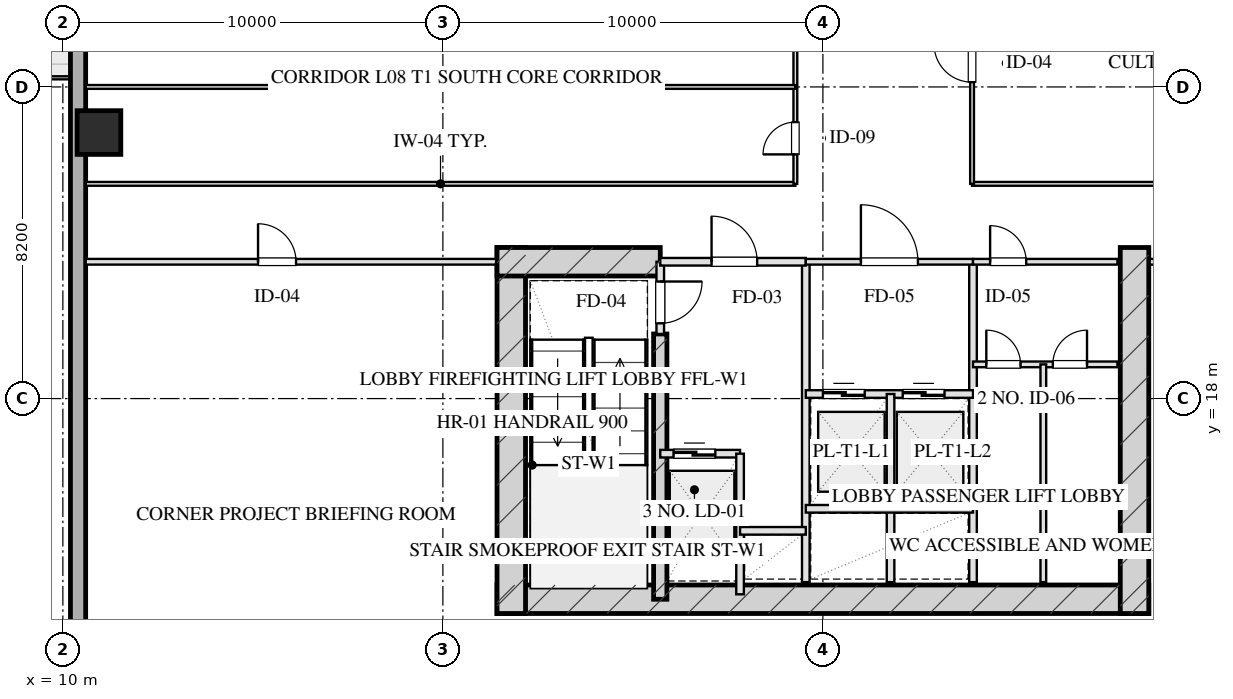
"""IFC4 building model, lengths in metres.
Left out: names, types, materials, properties, quantities, classifications, styles, units other than length and angle.
Written with IfcOpenShell. Run it as: python <this file> out.ifc"""

import sys

from ifc_helpers import new_model, si_unit, direction, frame, frame_2d, origin, origin_2d, place, context, subcontext, project, spatial, rectangle, hollow_rectangle, extrude, element, fill, save


model = new_model("IFC4")
c1 = context("Model", 3, precision=1e-05, world=origin(), true_north=direction((0.0, 1.0)))
c2 = subcontext(c1, "Body", "Model", "MODEL_VIEW")
j1 = project(units=[si_unit("LENGTHUNIT", "METRE"), si_unit("PLANEANGLEUNIT", "RADIAN")], contexts=[c1])
p1 = place(None, origin())
s1 = spatial("IfcSite", under=j1, at=p1, CompositionType="ELEMENT")
p2 = place(p1, origin())
s2 = spatial("IfcBuilding", under=s1, at=p2, CompositionType="ELEMENT")
p3 = place(p2, frame((0.0, 0.0, 38.0)))
s3 = spatial("IfcBuildingStorey", under=s2, at=p3, CompositionType="ELEMENT", Elevation=38.0)
p4 = place(p3, frame((21.425, 12.72, 0.0), z_axis=(0.0, 0.0, 1.0), x_axis=(1.0, 0.0, 0.0)))
e1 = element("IfcWall", 1, at=p4, inside=s3, PredefinedType="SHEAR", context=c2, shape_type="SweptSolid", body=[
    extrude(rectangle(XDim=17.15, YDim=0.75, at=frame_2d((8.575, 0.0))), origin(), (0.0, 0.0, 1.0), 4.0),
])
for number, where, z_axis, x_axis in (
    (2, (21.8, 21.975, 0.0), (0.0, 0.0, 1.0), (0.0, -1.0, 0.0)),
    (3, (38.2, 21.975, 0.0), (0.0, 0.0, 1.0), (0.0, -1.0, 0.0)),
):
    element("IfcWall", number, at=place(p3, frame(where, z_axis=z_axis, x_axis=x_axis)), inside=s3, PredefinedType="SHEAR", context=c2, shape_type="SweptSolid", body=[
        extrude(rectangle(XDim=9.63, YDim=0.75, at=frame_2d((4.815, 0.0))), origin(), (0.0, 0.0, 1.0), 4.0),
    ])
p5 = place(p3, frame((25.72, 19.7, 0.0), z_axis=(0.0, 0.0, 1.0), x_axis=(0.0, -1.0, 0.0)))
e4 = element("IfcWall", 4, at=p5, inside=s3, PredefinedType="SHEAR", context=c2, shape_type="SweptSolid", body=[
    extrude(rectangle(XDim=6.98, YDim=0.35, at=frame_2d((3.49, 0.0))), origin(), (0.0, 0.0, 1.0), 4.0),
])
p6 = place(p3, frame((21.425, 21.6, 0.0), z_axis=(0.0, 0.0, 1.0), x_axis=(1.0, 0.0, 0.0)))
e5 = element("IfcWall", 5, at=p6, inside=s3, PredefinedType="SHEAR", context=c2, shape_type="SweptSolid", body=[
    extrude(rectangle(XDim=4.295, YDim=0.75, at=frame_2d((2.147, 0.0))), origin(), (0.0, 0.0, 1.0), 4.0),
])
p7 = place(p3, frame((10.95, 25.0, 0.0), z_axis=(0.0, 0.0, 1.0), x_axis=(1.0, 0.0, 0.0)))
e6 = element("IfcColumn", 6, at=p7, inside=s3, PredefinedType="COLUMN", context=c2, shape_type="SweptSolid", body=[
    extrude(hollow_rectangle(XDim=1.15, YDim=1.15, WallThickness=0.04, at=origin_2d()), origin(), (0.0, 0.0, 1.0), 4.001),
])
p8 = place(p3, frame((10.4, 7.2, 0.0), z_axis=(0.0, 0.0, 1.0), x_axis=(0.0, 1.0, 0.0)))
e7 = element("IfcWall", 7, at=p8, inside=s3, PredefinedType="SOLIDWALL", context=c2, shape_type="SweptSolid", body=[
    extrude(rectangle(XDim=53.6, YDim=0.4, at=frame_2d((26.8, 0.0))), origin(), (0.0, 0.0, 1.0), 3.16),
])
p9 = place(p8, frame((28.15, 0.0, 0.75)))
e8 = element("IfcOpeningElement", 8, at=p9, cuts=e7, PredefinedType="OPENING", context=c2, shape_type="SweptSolid", body=[
    extrude(rectangle(XDim=2.5, YDim=1.75, at=frame_2d((1.25, 0.875))), frame((0.0, 0.21, 0.0), z_axis=(0.0, -1.0, 0.0), x_axis=(1.0, 0.0, 0.0)), (0.0, 0.0, 1.0), 0.42),
])
p10 = place(p8, frame((20.45, 0.0, 0.0)))
e9 = element("IfcOpeningElement", 9, at=p10, cuts=e7, PredefinedType="OPENING", context=c2, shape_type="SweptSolid", body=[
    extrude(rectangle(XDim=1.1, YDim=2.15, at=frame_2d((0.55, 1.075))), frame((0.0, 0.21, 0.0), z_axis=(0.0, -1.0, 0.0), x_axis=(1.0, 0.0, 0.0)), (0.0, 0.0, 1.0), 0.42),
])
p11 = place(p3, frame((25.72, 21.6, 0.0), z_axis=(0.0, 0.0, 1.0), x_axis=(0.0, -1.0, 0.0)))
e10 = element("IfcWall", 10, at=p11, inside=s3, PredefinedType="PARTITIONING", context=c2, shape_type="SweptSolid", body=[
    extrude(rectangle(XDim=1.9, YDim=0.2, at=frame_2d((0.95, 0.0))), origin(), (0.0, 0.0, 1.0), 3.725),
])
p12 = place(p11, frame((0.52, 0.0, 0.0)))
e11 = element("IfcOpeningElement", 11, at=p12, cuts=e10, PredefinedType="OPENING", context=c2, shape_type="SweptSolid", body=[
    extrude(rectangle(XDim=1.1, YDim=2.05, at=frame_2d((0.55, 1.025))), frame((0.0, 0.11, 0.0), z_axis=(0.0, -1.0, 0.0), x_axis=(1.0, 0.0, 0.0)), (0.0, 0.0, 1.0), 0.22),
])
p13 = place(p3, frame((29.55, 21.6, 0.0), z_axis=(0.0, 0.0, 1.0), x_axis=(0.0, -1.0, 0.0)))
e12 = element("IfcWall", 12, at=p13, inside=s3, PredefinedType="PARTITIONING", context=c2, shape_type="SweptSolid", body=[
    extrude(rectangle(XDim=8.43, YDim=0.2, at=frame_2d((4.215, 0.0))), origin(), (0.0, 0.0, 1.0), 3.725),
])
p14 = place(p3, frame((25.72, 21.6, 0.0), z_axis=(0.0, 0.0, 1.0), x_axis=(1.0, 0.0, 0.0)))
e13 = element("IfcWall", 13, at=p14, inside=s3, PredefinedType="PARTITIONING", context=c2, shape_type="SweptSolid", body=[
    extrude(rectangle(XDim=3.83, YDim=0.2, at=frame_2d((1.915, 0.0))), origin(), (0.0, 0.0, 1.0), 3.725),
])
p15 = place(p14, frame((1.35, 0.0, 0.0)))
e14 = element("IfcOpeningElement", 14, at=p15, cuts=e13, PredefinedType="OPENING", context=c2, shape_type="SweptSolid", body=[
    extrude(rectangle(XDim=1.2, YDim=2.05, at=frame_2d((0.6, 1.025))), frame((0.0, 0.11, 0.0), z_axis=(0.0, -1.0, 0.0), x_axis=(1.0, 0.0, 0.0)), (0.0, 0.0, 1.0), 0.22),
])
p16 = place(p3, frame((25.72, 16.55, 0.0), z_axis=(0.0, 0.0, 1.0), x_axis=(1.0, 0.0, 0.0)))
e15 = element("IfcWall", 15, at=p16, inside=s3, PredefinedType="PARTITIONING", context=c2, shape_type="SweptSolid", body=[
    extrude(rectangle(XDim=2.1, YDim=0.2, at=frame_2d((1.05, 0.0))), origin(), (0.0, 0.0, 1.0), 3.725),
])
p17 = place(p16, frame((0.35, 0.0, 0.0)))
e16 = element("IfcOpeningElement", 16, at=p17, cuts=e15, PredefinedType="OPENING", context=c2, shape_type="SweptSolid", body=[
    extrude(rectangle(XDim=1.1, YDim=2.05, at=frame_2d((0.55, 1.025))), frame((0.0, 0.11, 0.0), z_axis=(0.0, -1.0, 0.0), x_axis=(1.0, 0.0, 0.0)), (0.0, 0.0, 1.0), 0.22),
])
p18 = place(p3, frame((27.82, 16.55, 0.0), z_axis=(0.0, 0.0, 1.0), x_axis=(0.0, -1.0, 0.0)))
e17 = element("IfcWall", 17, at=p18, inside=s3, PredefinedType="PARTITIONING", context=c2, shape_type="SweptSolid", body=[
    extrude(rectangle(XDim=3.7, YDim=0.2, at=frame_2d((1.85, 0.0))), origin(), (0.0, 0.0, 1.0), 3.725),
])
p19 = place(p3, frame((27.82, 14.52, 0.0), z_axis=(0.0, 0.0, 1.0), x_axis=(1.0, 0.0, 0.0)))
e18 = element("IfcWall", 18, at=p19, inside=s3, PredefinedType="PARTITIONING", context=c2, shape_type="SweptSolid", body=[
    extrude(rectangle(XDim=1.73, YDim=0.2, at=frame_2d((0.865, 0.0))), origin(), (0.0, 0.0, 1.0), 3.725),
])
p20 = place(p3, frame((33.95, 21.6, 0.0), z_axis=(0.0, 0.0, 1.0), x_axis=(0.0, -1.0, 0.0)))
e19 = element("IfcWall", 19, at=p20, inside=s3, PredefinedType="PARTITIONING", context=c2, shape_type="SweptSolid", body=[
    extrude(rectangle(XDim=8.43, YDim=0.2, at=frame_2d((4.215, 0.0))), origin(), (0.0, 0.0, 1.0), 3.725),
])
p21 = place(p3, frame((29.55, 21.6, 0.0), z_axis=(0.0, 0.0, 1.0), x_axis=(1.0, 0.0, 0.0)))
e20 = element("IfcWall", 20, at=p21, inside=s3, PredefinedType="PARTITIONING", context=c2, shape_type="SweptSolid", body=[
    extrude(rectangle(XDim=4.4, YDim=0.15, at=frame_2d((2.2, 0.0))), origin(), (0.0, 0.0, 1.0), 3.725),
])
p22 = place(p21, frame((1.45, 0.0, 0.0)))
e21 = element("IfcOpeningElement", 21, at=p22, cuts=e20, PredefinedType="OPENING", context=c2, shape_type="SweptSolid", body=[
    extrude(rectangle(XDim=1.5, YDim=2.05, at=frame_2d((0.75, 1.025))), frame((0.0, 0.085, 0.0), z_axis=(0.0, -1.0, 0.0), x_axis=(1.0, 0.0, 0.0)), (0.0, 0.0, 1.0), 0.17),
])
p23 = place(p3, frame((29.55, 18.12, 0.0), z_axis=(0.0, 0.0, 1.0), x_axis=(1.0, 0.0, 0.0)))
e22 = element("IfcWall", 22, at=p23, inside=s3, PredefinedType="PARTITIONING", context=c2, shape_type="SweptSolid", body=[
    extrude(rectangle(XDim=4.4, YDim=0.2, at=frame_2d((2.2, 0.0))), origin(), (0.0, 0.0, 1.0), 3.725),
])
p24 = place(p23, frame((0.45, 0.0, 0.0)))
e23 = element("IfcOpeningElement", 23, at=p24, cuts=e22, PredefinedType="OPENING", context=c2, shape_type="SweptSolid", body=[
    extrude(rectangle(XDim=1.1, YDim=2.05, at=frame_2d((0.55, 1.025))), frame((0.0, 0.11, 0.0), z_axis=(0.0, -1.0, 0.0), x_axis=(1.0, 0.0, 0.0)), (0.0, 0.0, 1.0), 0.22),
])
p25 = place(p23, frame((2.55, 0.0, 0.0)))
e24 = element("IfcOpeningElement", 24, at=p25, cuts=e22, PredefinedType="OPENING", context=c2, shape_type="SweptSolid", body=[
    extrude(rectangle(XDim=1.1, YDim=2.05, at=frame_2d((0.55, 1.025))), frame((0.0, 0.11, 0.0), z_axis=(0.0, -1.0, 0.0), x_axis=(1.0, 0.0, 0.0)), (0.0, 0.0, 1.0), 0.22),
])
p26 = place(p3, frame((31.78, 18.12, 0.0), z_axis=(0.0, 0.0, 1.0), x_axis=(0.0, -1.0, 0.0)))
e25 = element("IfcWall", 25, at=p26, inside=s3, PredefinedType="PARTITIONING", context=c2, shape_type="SweptSolid", body=[
    extrude(rectangle(XDim=4.95, YDim=0.2, at=frame_2d((2.475, 0.0))), origin(), (0.0, 0.0, 1.0), 3.725),
])
p27 = place(p3, frame((29.55, 15.1, 0.0), z_axis=(0.0, 0.0, 1.0), x_axis=(1.0, 0.0, 0.0)))
e26 = element("IfcWall", 26, at=p27, inside=s3, PredefinedType="PARTITIONING", context=c2, shape_type="SweptSolid", body=[
    extrude(rectangle(XDim=4.4, YDim=0.2, at=frame_2d((2.2, 0.0))), origin(), (0.0, 0.0, 1.0), 3.725),
])
p28 = place(p3, frame((33.95, 21.6, 0.0), z_axis=(0.0, 0.0, 1.0), x_axis=(1.0, 0.0, 0.0)))
e27 = element("IfcWall", 27, at=p28, inside=s3, PredefinedType="PARTITIONING", context=c2, shape_type="SweptSolid", body=[
    extrude(rectangle(XDim=3.8, YDim=0.15, at=frame_2d((1.9, 0.0))), origin(), (0.0, 0.0, 1.0), 3.725),
])
p29 = place(p28, frame((0.45, 0.0, 0.0)))
e28 = element("IfcOpeningElement", 28, at=p29, cuts=e27, PredefinedType="OPENING", context=c2, shape_type="SweptSolid", body=[
    extrude(rectangle(XDim=0.95, YDim=2.05, at=frame_2d((0.475, 1.025))), frame((0.0, 0.085, 0.0), z_axis=(0.0, -1.0, 0.0), x_axis=(1.0, 0.0, 0.0)), (0.0, 0.0, 1.0), 0.17),
])
p30 = place(p3, frame((33.95, 18.9, 0.0), z_axis=(0.0, 0.0, 1.0), x_axis=(1.0, 0.0, 0.0)))
e29 = element("IfcWall", 29, at=p30, inside=s3, PredefinedType="PARTITIONING", context=c2, shape_type="SweptSolid", body=[
    extrude(rectangle(XDim=3.8, YDim=0.15, at=frame_2d((1.9, 0.0))), origin(), (0.0, 0.0, 1.0), 3.725),
])
p31 = place(p30, frame((0.35, 0.0, 0.0)))
e30 = element("IfcOpeningElement", 30, at=p31, cuts=e29, PredefinedType="OPENING", context=c2, shape_type="SweptSolid", body=[
    extrude(rectangle(XDim=0.9, YDim=2.05, at=frame_2d((0.45, 1.025))), frame((0.0, 0.085, 0.0), z_axis=(0.0, -1.0, 0.0), x_axis=(1.0, 0.0, 0.0)), (0.0, 0.0, 1.0), 0.17),
])
p32 = place(p30, frame((2.1, 0.0, 0.0)))
e31 = element("IfcOpeningElement", 31, at=p32, cuts=e29, PredefinedType="OPENING", context=c2, shape_type="SweptSolid", body=[
    extrude(rectangle(XDim=0.9, YDim=2.05, at=frame_2d((0.45, 1.025))), frame((0.0, 0.085, 0.0), z_axis=(0.0, -1.0, 0.0), x_axis=(1.0, 0.0, 0.0)), (0.0, 0.0, 1.0), 0.17),
])
p33 = place(p3, frame((35.8, 18.9, 0.0), z_axis=(0.0, 0.0, 1.0), x_axis=(0.0, -1.0, 0.0)))
e32 = element("IfcWall", 32, at=p33, inside=s3, PredefinedType="PARTITIONING", context=c2, shape_type="SweptSolid", body=[
    extrude(rectangle(XDim=5.73, YDim=0.15, at=frame_2d((2.865, 0.0))), origin(), (0.0, 0.0, 1.0), 3.725),
])
p34 = place(p3, frame((10.6, 21.6, 0.0), z_axis=(0.0, 0.0, 1.0), x_axis=(1.0, 0.0, 0.0)))
e33 = element("IfcWall", 33, at=p34, inside=s3, PredefinedType="PARTITIONING", context=c2, shape_type="SweptSolid", body=[
    extrude(rectangle(XDim=10.8, YDim=0.15, at=frame_2d((5.4, 0.0))), origin(), (0.0, 0.0, 1.0), 3.725),
])
p35 = place(p34, frame((4.536, 0.0, 0.0)))
e34 = element("IfcOpeningElement", 34, at=p35, cuts=e33, PredefinedType="OPENING", context=c2, shape_type="SweptSolid", body=[
    extrude(rectangle(XDim=1.0, YDim=2.05, at=frame_2d((0.5, 1.025))), frame((0.0, 0.085, 0.0), z_axis=(0.0, -1.0, 0.0), x_axis=(1.0, 0.0, 0.0)), (0.0, 0.0, 1.0), 0.17),
])
p36 = place(p3, frame((38.6, 21.6, 0.0), z_axis=(0.0, 0.0, 1.0), x_axis=(1.0, 0.0, 0.0)))
e35 = element("IfcWall", 35, at=p36, inside=s3, PredefinedType="PARTITIONING", context=c2, shape_type="SweptSolid", body=[
    extrude(rectangle(XDim=10.8, YDim=0.15, at=frame_2d((5.4, 0.0))), origin(), (0.0, 0.0, 1.0), 3.725),
])
p37 = place(p36, frame((4.536, 0.0, 0.0)))
e36 = element("IfcOpeningElement", 36, at=p37, cuts=e35, PredefinedType="OPENING", context=c2, shape_type="SweptSolid", body=[
    extrude(rectangle(XDim=1.0, YDim=2.05, at=frame_2d((0.5, 1.025))), frame((0.0, 0.085, 0.0), z_axis=(0.0, -1.0, 0.0), x_axis=(1.0, 0.0, 0.0)), (0.0, 0.0, 1.0), 0.17),
])
p38 = place(p3, frame((10.6, 23.65, 0.0), z_axis=(0.0, 0.0, 1.0), x_axis=(1.0, 0.0, 0.0)))
e37 = element("IfcWall", 37, at=p38, inside=s3, PredefinedType="MOVABLE", context=c2, shape_type="SweptSolid", body=[
    extrude(rectangle(XDim=18.675, YDim=0.1, at=frame_2d((9.337, 0.0))), origin(), (0.0, 0.0, 1.0), 3.725),
])
p39 = place(p3, frame((33.925, 23.65, 0.0), z_axis=(0.0, 0.0, 1.0), x_axis=(1.0, 0.0, 0.0)))
e38 = element("IfcWall", 38, at=p39, inside=s3, PredefinedType="MOVABLE", context=c2, shape_type="SweptSolid", body=[
    extrude(rectangle(XDim=15.475, YDim=0.1, at=frame_2d((7.737, 0.0))), origin(), (0.0, 0.0, 1.0), 3.725),
])
p40 = place(p3, frame((29.275, 23.65, 0.0), z_axis=(0.0, 0.0, 1.0), x_axis=(0.0, 1.0, 0.0)))
e39 = element("IfcWall", 39, at=p40, inside=s3, PredefinedType="MOVABLE", context=c2, shape_type="SweptSolid", body=[
    extrude(rectangle(XDim=20.7, YDim=0.1, at=frame_2d((10.35, 0.0))), origin(), (0.0, 0.0, 1.0), 3.725),
])
p41 = place(p40, frame((0.775, 0.0, 0.0)))
e40 = element("IfcOpeningElement", 40, at=p41, cuts=e39, PredefinedType="OPENING", context=c2, shape_type="SweptSolid", body=[
    extrude(rectangle(XDim=0.85, YDim=2.05, at=frame_2d((0.425, 1.025))), frame((0.0, 0.06, 0.0), z_axis=(0.0, -1.0, 0.0), x_axis=(1.0, 0.0, 0.0)), (0.0, 0.0, 1.0), 0.12),
])
p42 = place(p40, frame((3.95, 0.0, 0.0)))
e41 = element("IfcOpeningElement", 41, at=p42, cuts=e39, PredefinedType="OPENING", context=c2, shape_type="SweptSolid", body=[
    extrude(rectangle(XDim=1.0, YDim=2.05, at=frame_2d((0.5, 1.025))), frame((0.0, 0.06, 0.0), z_axis=(0.0, -1.0, 0.0), x_axis=(1.0, 0.0, 0.0)), (0.0, 0.0, 1.0), 0.12),
])
p43 = place(p40, frame((8.364, 0.0, 0.0)))
e42 = element("IfcOpeningElement", 42, at=p43, cuts=e39, PredefinedType="OPENING", context=c2, shape_type="SweptSolid", body=[
    extrude(rectangle(XDim=1.05, YDim=2.05, at=frame_2d((0.525, 1.025))), frame((0.0, 0.06, 0.0), z_axis=(0.0, -1.0, 0.0), x_axis=(1.0, 0.0, 0.0)), (0.0, 0.0, 1.0), 0.12),
])
p44 = place(p40, frame((12.864, 0.0, 0.0)))
e43 = element("IfcOpeningElement", 43, at=p44, cuts=e39, PredefinedType="OPENING", context=c2, shape_type="SweptSolid", body=[
    extrude(rectangle(XDim=1.0, YDim=2.05, at=frame_2d((0.5, 1.025))), frame((0.0, 0.06, 0.0), z_axis=(0.0, -1.0, 0.0), x_axis=(1.0, 0.0, 0.0)), (0.0, 0.0, 1.0), 0.12),
])
p45 = place(p40, frame((16.383, 0.0, 0.0)))
e44 = element("IfcOpeningElement", 44, at=p45, cuts=e39, PredefinedType="OPENING", context=c2, shape_type="SweptSolid", body=[
    extrude(rectangle(XDim=1.0, YDim=2.05, at=frame_2d((0.5, 1.025))), frame((0.0, 0.06, 0.0), z_axis=(0.0, -1.0, 0.0), x_axis=(1.0, 0.0, 0.0)), (0.0, 0.0, 1.0), 0.12),
])
p46 = place(p40, frame((19.058, 0.0, 0.0)))
e45 = element("IfcOpeningElement", 45, at=p46, cuts=e39, PredefinedType="OPENING", context=c2, shape_type="SweptSolid", body=[
    extrude(rectangle(XDim=1.0, YDim=2.05, at=frame_2d((0.5, 1.025))), frame((0.0, 0.06, 0.0), z_axis=(0.0, -1.0, 0.0), x_axis=(1.0, 0.0, 0.0)), (0.0, 0.0, 1.0), 0.12),
])
p47 = place(p3, frame((33.925, 23.65, 0.0), z_axis=(0.0, 0.0, 1.0), x_axis=(0.0, 1.0, 0.0)))
e46 = element("IfcWall", 46, at=p47, inside=s3, PredefinedType="MOVABLE", context=c2, shape_type="SweptSolid", body=[
    extrude(rectangle(XDim=20.7, YDim=0.1, at=frame_2d((10.35, 0.0))), origin(), (0.0, 0.0, 1.0), 3.725),
])
p48 = place(p47, frame((2.675, 0.0, 0.0)))
e47 = element("IfcOpeningElement", 47, at=p48, cuts=e46, PredefinedType="OPENING", context=c2, shape_type="SweptSolid", body=[
    extrude(rectangle(XDim=1.0, YDim=2.05, at=frame_2d((0.5, 1.025))), frame((0.0, 0.06, 0.0), z_axis=(0.0, -1.0, 0.0), x_axis=(1.0, 0.0, 0.0)), (0.0, 0.0, 1.0), 0.12),
])
p49 = place(p47, frame((9.85, 0.0, 0.0)))
e48 = element("IfcOpeningElement", 48, at=p49, cuts=e46, PredefinedType="OPENING", context=c2, shape_type="SweptSolid", body=[
    extrude(rectangle(XDim=1.0, YDim=2.05, at=frame_2d((0.5, 1.025))), frame((0.0, 0.06, 0.0), z_axis=(0.0, -1.0, 0.0), x_axis=(1.0, 0.0, 0.0)), (0.0, 0.0, 1.0), 0.12),
])
p50 = place(p47, frame((17.025, 0.0, 0.0)))
e49 = element("IfcOpeningElement", 49, at=p50, cuts=e46, PredefinedType="OPENING", context=c2, shape_type="SweptSolid", body=[
    extrude(rectangle(XDim=1.0, YDim=2.05, at=frame_2d((0.5, 1.025))), frame((0.0, 0.06, 0.0), z_axis=(0.0, -1.0, 0.0), x_axis=(1.0, 0.0, 0.0)), (0.0, 0.0, 1.0), 0.12),
])
p51 = place(p3, frame((10.6, 26.2, 0.0), z_axis=(0.0, 0.0, 1.0), x_axis=(1.0, 0.0, 0.0)))
e50 = element("IfcWall", 50, at=p51, inside=s3, PredefinedType="MOVABLE", context=c2, shape_type="SweptSolid", body=[
    extrude(rectangle(XDim=18.675, YDim=0.1, at=frame_2d((9.337, 0.0))), origin(), (0.0, 0.0, 1.0), 3.725),
])
p52 = place(p12, origin())
e51 = element("IfcDoor", 51, at=p52, inside=s3, OperationType="SINGLE_SWING_LEFT", PredefinedType="DOOR", context=c2, shape_type="SweptSolid", body=[
    extrude(rectangle(XDim=1.1, YDim=2.05, at=frame_2d((0.55, 1.025))), frame((0.0, 0.025, 0.0), z_axis=(0.0, -1.0, 0.0), x_axis=(1.0, 0.0, 0.0)), (0.0, 0.0, 1.0), 0.05),
])
fill(e11, e51)
p53 = place(p15, origin())
e52 = element("IfcDoor", 52, at=p53, inside=s3, OperationType="SINGLE_SWING_LEFT", PredefinedType="DOOR", context=c2, shape_type="SweptSolid", body=[
    extrude(rectangle(XDim=1.2, YDim=2.05, at=frame_2d((0.6, 1.025))), frame((0.0, 0.025, 0.0), z_axis=(0.0, -1.0, 0.0), x_axis=(1.0, 0.0, 0.0)), (0.0, 0.0, 1.0), 0.05),
])
fill(e14, e52)
p54 = place(p17, origin())
e53 = element("IfcDoor", 53, at=p54, inside=s3, OperationType="DOUBLE_DOOR_SLIDING", PredefinedType="DOOR", context=c2, shape_type="SweptSolid", body=[
    extrude(rectangle(XDim=1.1, YDim=2.05, at=frame_2d((0.55, 1.025))), frame((0.0, 0.025, 0.0), z_axis=(0.0, -1.0, 0.0), x_axis=(1.0, 0.0, 0.0)), (0.0, 0.0, 1.0), 0.05),
])
fill(e16, e53)
p55 = place(p22, origin())
e54 = element("IfcDoor", 54, at=p55, inside=s3, OperationType="SINGLE_SWING_LEFT", PredefinedType="DOOR", context=c2, shape_type="SweptSolid", body=[
    extrude(rectangle(XDim=1.5, YDim=2.05, at=frame_2d((0.75, 1.025))), frame((0.0, 0.025, 0.0), z_axis=(0.0, -1.0, 0.0), x_axis=(1.0, 0.0, 0.0)), (0.0, 0.0, 1.0), 0.05),
])
fill(e21, e54)
p56 = place(p24, origin())
e55 = element("IfcDoor", 55, at=p56, inside=s3, OperationType="DOUBLE_DOOR_SLIDING", PredefinedType="DOOR", context=c2, shape_type="SweptSolid", body=[
    extrude(rectangle(XDim=1.1, YDim=2.05, at=frame_2d((0.55, 1.025))), frame((0.0, 0.025, 0.0), z_axis=(0.0, -1.0, 0.0), x_axis=(1.0, 0.0, 0.0)), (0.0, 0.0, 1.0), 0.05),
])
fill(e23, e55)
p57 = place(p25, origin())
e56 = element("IfcDoor", 56, at=p57, inside=s3, OperationType="DOUBLE_DOOR_SLIDING", PredefinedType="DOOR", context=c2, shape_type="SweptSolid", body=[
    extrude(rectangle(XDim=1.1, YDim=2.05, at=frame_2d((0.55, 1.025))), frame((0.0, 0.025, 0.0), z_axis=(0.0, -1.0, 0.0), x_axis=(1.0, 0.0, 0.0)), (0.0, 0.0, 1.0), 0.05),
])
fill(e24, e56)
p58 = place(p29, origin())
e57 = element("IfcDoor", 57, at=p58, inside=s3, OperationType="SINGLE_SWING_LEFT", PredefinedType="DOOR", context=c2, shape_type="SweptSolid", body=[
    extrude(rectangle(XDim=0.95, YDim=2.05, at=frame_2d((0.475, 1.025))), frame((0.0, 0.025, 0.0), z_axis=(0.0, -1.0, 0.0), x_axis=(1.0, 0.0, 0.0)), (0.0, 0.0, 1.0), 0.05),
])
fill(e28, e57)
p59 = place(p31, origin())
e58 = element("IfcDoor", 58, at=p59, inside=s3, OperationType="SINGLE_SWING_LEFT", PredefinedType="DOOR", context=c2, shape_type="SweptSolid", body=[
    extrude(rectangle(XDim=0.9, YDim=2.05, at=frame_2d((0.45, 1.025))), frame((0.0, 0.025, 0.0), z_axis=(0.0, -1.0, 0.0), x_axis=(1.0, 0.0, 0.0)), (0.0, 0.0, 1.0), 0.05),
])
fill(e30, e58)
p60 = place(p32, origin())
e59 = element("IfcDoor", 59, at=p60, inside=s3, OperationType="SINGLE_SWING_RIGHT", PredefinedType="DOOR", context=c2, shape_type="SweptSolid", body=[
    extrude(rectangle(XDim=0.9, YDim=2.05, at=frame_2d((0.45, 1.025))), frame((0.0, 0.025, 0.0), z_axis=(0.0, -1.0, 0.0), x_axis=(1.0, 0.0, 0.0)), (0.0, 0.0, 1.0), 0.05),
])
fill(e31, e59)
p61 = place(p35, origin())
e60 = element("IfcDoor", 60, at=p61, inside=s3, OperationType="SINGLE_SWING_LEFT", PredefinedType="DOOR", context=c2, shape_type="SweptSolid", body=[
    extrude(rectangle(XDim=1.0, YDim=2.05, at=frame_2d((0.5, 1.025))), frame((0.0, 0.025, 0.0), z_axis=(0.0, -1.0, 0.0), x_axis=(1.0, 0.0, 0.0)), (0.0, 0.0, 1.0), 0.05),
])
fill(e34, e60)
p62 = place(p41, origin())
e61 = element("IfcDoor", 61, at=p62, inside=s3, OperationType="SINGLE_SWING_LEFT", PredefinedType="DOOR", context=c2, shape_type="SweptSolid", body=[
    extrude(rectangle(XDim=0.85, YDim=2.05, at=frame_2d((0.425, 1.025))), frame((0.0, 0.025, 0.0), z_axis=(0.0, -1.0, 0.0), x_axis=(1.0, 0.0, 0.0)), (0.0, 0.0, 1.0), 0.05),
])
fill(e40, e61)
p63 = place(p48, origin())
e62 = element("IfcDoor", 62, at=p63, inside=s3, OperationType="SINGLE_SWING_RIGHT", PredefinedType="DOOR", context=c2, shape_type="SweptSolid", body=[
    extrude(rectangle(XDim=1.0, YDim=2.05, at=frame_2d((0.5, 1.025))), frame((0.0, 0.025, 0.0), z_axis=(0.0, -1.0, 0.0), x_axis=(1.0, 0.0, 0.0)), (0.0, 0.0, 1.0), 0.05),
])
fill(e47, e62)
save(model, sys.argv[1])
